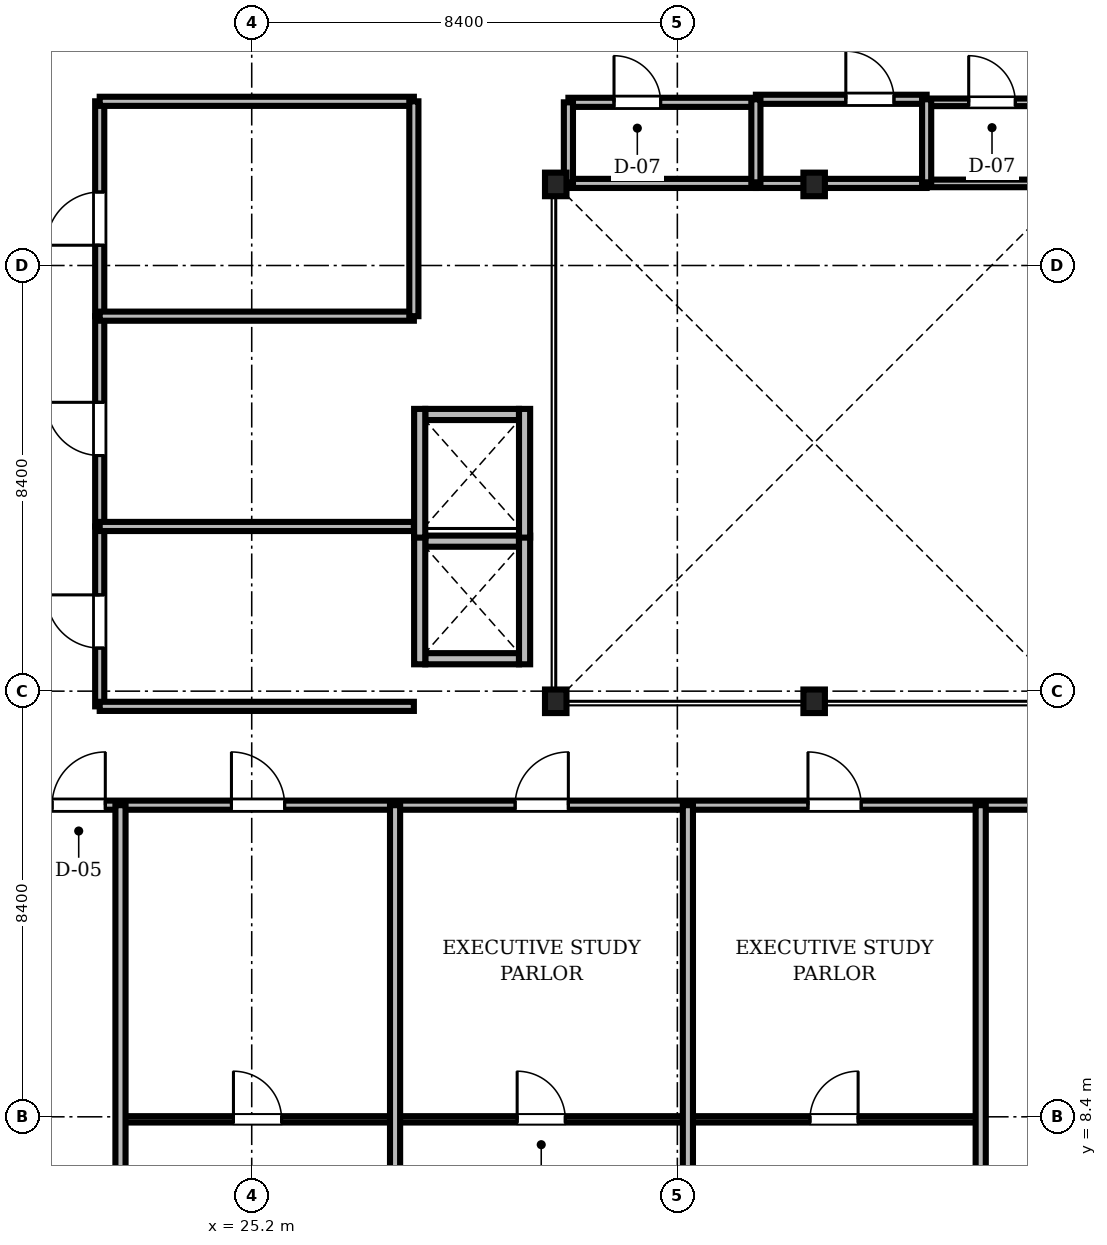
"""IFC4 building model, lengths in metres.
Left out: names, types, materials, properties, quantities, classifications, styles, units other than length and angle.
Written with IfcOpenShell. Run it as: python <this file> out.ifc"""

import sys

from ifc_helpers import new_model, si_unit, direction, frame, frame_2d, origin, origin_2d, place, context, subcontext, project, spatial, rectangle, i_section, extrude, source, transform, mapped, element, fill, save


model = new_model("IFC4")
c1 = context("Model", 3, precision=1e-05, world=origin(), true_north=direction((0.0, 1.0)))
c2 = subcontext(c1, "Body", "Model", "MODEL_VIEW")
j1 = project(units=[si_unit("LENGTHUNIT", "METRE"), si_unit("PLANEANGLEUNIT", "RADIAN")], contexts=[c1])
p1 = place(None, origin())
s1 = spatial("IfcSite", under=j1, at=p1, CompositionType="ELEMENT")
p2 = place(p1, origin())
s2 = spatial("IfcBuilding", under=s1, at=p2, CompositionType="ELEMENT")
p3 = place(p2, frame((0.0, 0.0, 148.3)))
s3 = spatial("IfcBuildingStorey", under=s2, at=p3, CompositionType="ELEMENT", Elevation=148.3)
m1 = source(origin(), c2, "Body", "SweptSolid", [
    extrude(i_section(OverallWidth=0.424, OverallDepth=0.465, WebThickness=0.035, FlangeThickness=0.056, FilletRadius=0.015, at=origin_2d()), origin(), (0.0, 0.0, 1.0), 3.46),
])
for number, where, z_axis, x_axis in (
    (1, (31.2, 16.6, 0.0), (0.0, 0.0, 1.0), (1.0, 0.0, 0.0)),
    (2, (36.3, 16.6, 0.0), (0.0, 0.0, 1.0), (1.0, 0.0, 0.0)),
    (3, (36.3, 26.8, 0.0), (0.0, 0.0, 1.0), (1.0, 0.0, 0.0)),
    (4, (31.2, 26.8, 0.0), (0.0, 0.0, 1.0), (1.0, 0.0, 0.0)),
):
    element("IfcColumn", number, at=place(p3, frame(where, z_axis=z_axis, x_axis=x_axis)), inside=s3, PredefinedType="COLUMN", context=c2, shape_type="MappedRepresentation", body=[
        mapped(m1, transform((0.0, 0.0, 0.0), scale=1.0)),
    ])
m2 = source(origin(), c2, "Body", "SweptSolid", [
    extrude(rectangle(XDim=1.85, YDim=0.22, at=frame_2d((0.925, 0.0))), origin(), (0.0, 0.0, 1.0), 3.46),
])
for number, where, z_axis, x_axis in (
    (5, (28.625, 17.44, 0.0), (0.0, 0.0, 1.0), (1.0, 0.0, 0.0)),
    (6, (28.625, 19.76, 0.0), (0.0, 0.0, 1.0), (1.0, 0.0, 0.0)),
):
    element("IfcWall", number, at=place(p3, frame(where, z_axis=z_axis, x_axis=x_axis)), inside=s3, PredefinedType="SOLIDWALL", context=c2, shape_type="MappedRepresentation", body=[
        mapped(m2, transform((0.0, 0.0, 0.0), scale=1.0)),
    ])
m3 = source(origin(), c2, "Body", "SweptSolid", [
    extrude(rectangle(XDim=2.54, YDim=0.22, at=frame_2d((1.27, 0.0))), origin(), (0.0, 0.0, 1.0), 3.46),
])
for number, where, z_axis, x_axis in (
    (7, (28.515, 17.33, 0.0), (0.0, 0.0, 1.0), (0.0, 1.0, 0.0)),
    (8, (30.585, 17.33, 0.0), (0.0, 0.0, 1.0), (0.0, 1.0, 0.0)),
):
    element("IfcWall", number, at=place(p3, frame(where, z_axis=z_axis, x_axis=x_axis)), inside=s3, PredefinedType="SOLIDWALL", context=c2, shape_type="MappedRepresentation", body=[
        mapped(m3, transform((0.0, 0.0, 0.0), scale=1.0)),
    ])
p4 = place(p3, frame((28.625, 22.26, 0.0), z_axis=(0.0, 0.0, 1.0), x_axis=(1.0, 0.0, 0.0)))
e9 = element("IfcWall", 9, at=p4, inside=s3, PredefinedType="SOLIDWALL", context=c2, shape_type="MappedRepresentation", body=[
    mapped(m2, transform((0.0, 0.0, 0.0), scale=1.0)),
])
for number, where, z_axis, x_axis in (
    (10, (28.515, 19.83, 0.0), (0.0, 0.0, 1.0), (0.0, 1.0, 0.0)),
    (11, (30.585, 19.83, 0.0), (0.0, 0.0, 1.0), (0.0, 1.0, 0.0)),
):
    element("IfcWall", number, at=place(p3, frame(where, z_axis=z_axis, x_axis=x_axis)), inside=s3, PredefinedType="SOLIDWALL", context=c2, shape_type="MappedRepresentation", body=[
        mapped(m3, transform((0.0, 0.0, 0.0), scale=1.0)),
    ])
m4 = source(origin(), c2, "Body", "SweptSolid", [
    extrude(rectangle(XDim=46.156, YDim=0.18, at=frame_2d((23.078, 0.0))), origin(), (0.0, 0.0, 1.0), 2.702),
])
p5 = place(p3, frame((6.922, 14.55, 0.0), z_axis=(0.0, 0.0, 1.0), x_axis=(1.0, 0.0, 0.0)))
e12 = element("IfcWall", 12, at=p5, inside=s3, PredefinedType="PARTITIONING", context=c2, shape_type="MappedRepresentation", body=[
    mapped(m4, transform((0.0, 0.0, 0.0), scale=1.0)),
])
m5 = source(origin(), c2, "Body", "SweptSolid", [
    extrude(rectangle(XDim=1.05, YDim=2.2, at=frame_2d((0.525, 1.1))), frame((0.0, 0.1, 0.0), z_axis=(0.0, -1.0, 0.0), x_axis=(1.0, 0.0, 0.0)), (0.0, 0.0, 1.0), 0.2),
])
p6 = place(p5, frame((14.338, 0.0, 0.0)))
e13 = element("IfcOpeningElement", 13, at=p6, cuts=e12, PredefinedType="OPENING", context=c2, shape_type="MappedRepresentation", body=[
    mapped(m5, transform((0.0, 0.0, 0.0), scale=1.0)),
])
p7 = place(p5, frame((17.878, 0.0, 0.0)))
e14 = element("IfcOpeningElement", 14, at=p7, cuts=e12, PredefinedType="OPENING", context=c2, shape_type="MappedRepresentation", body=[
    mapped(m5, transform((0.0, 0.0, 0.0), scale=1.0)),
])
p8 = place(p5, frame((23.477, 0.0, 0.0)))
e15 = element("IfcOpeningElement", 15, at=p8, cuts=e12, PredefinedType="OPENING", context=c2, shape_type="MappedRepresentation", body=[
    mapped(m5, transform((0.0, 0.0, 0.0), scale=1.0)),
])
p9 = place(p5, frame((29.256, 0.0, 0.0)))
e16 = element("IfcOpeningElement", 16, at=p9, cuts=e12, PredefinedType="OPENING", context=c2, shape_type="MappedRepresentation", body=[
    mapped(m5, transform((0.0, 0.0, 0.0), scale=1.0)),
])
p10 = place(p5, frame((35.035, 0.0, 0.0)))
e17 = element("IfcOpeningElement", 17, at=p10, cuts=e12, PredefinedType="OPENING", context=c2, shape_type="MappedRepresentation", body=[
    mapped(m5, transform((0.0, 0.0, 0.0), scale=1.0)),
])
p11 = place(p5, frame((41.766, 0.0, 0.0)))
e18 = element("IfcOpeningElement", 18, at=p11, cuts=e12, PredefinedType="OPENING", context=c2, shape_type="MappedRepresentation", body=[
    mapped(m5, transform((0.0, 0.0, 0.0), scale=1.0)),
])
m6 = source(origin(), c2, "Body", "SweptSolid", [
    extrude(rectangle(XDim=5.779, YDim=0.125, at=frame_2d((2.89, 0.0))), origin(), (0.0, 0.0, 1.0), 2.852),
])
p12 = place(p3, frame((28.029, 8.35, 0.0), z_axis=(0.0, 0.0, 1.0), x_axis=(1.0, 0.0, 0.0)))
e19 = element("IfcWall", 19, at=p12, inside=s3, PredefinedType="PARTITIONING", context=c2, shape_type="MappedRepresentation", body=[
    mapped(m6, transform((0.0, 0.0, 0.0), scale=1.0)),
])
m7 = source(origin(), c2, "Body", "SweptSolid", [
    extrude(rectangle(XDim=0.95, YDim=2.15, at=frame_2d((0.475, 1.075))), frame((0.0, 0.073, 0.0), z_axis=(0.0, -1.0, 0.0), x_axis=(1.0, 0.0, 0.0)), (0.0, 0.0, 1.0), 0.145),
])
p13 = place(p12, frame((2.41, 0.0, 0.0)))
e20 = element("IfcOpeningElement", 20, at=p13, cuts=e19, PredefinedType="OPENING", context=c2, shape_type="MappedRepresentation", body=[
    mapped(m7, transform((0.0, 0.0, 0.0), scale=1.0)),
])
m8 = source(origin(), c2, "Body", "SweptSolid", [
    extrude(rectangle(XDim=5.779, YDim=0.125, at=frame_2d((2.889, 0.0))), origin(), (0.0, 0.0, 1.0), 2.852),
])
p14 = place(p3, frame((33.808, 8.35, 0.0), z_axis=(0.0, 0.0, 1.0), x_axis=(1.0, 0.0, 0.0)))
e21 = element("IfcWall", 21, at=p14, inside=s3, PredefinedType="PARTITIONING", context=c2, shape_type="MappedRepresentation", body=[
    mapped(m8, transform((0.0, 0.0, 0.0), scale=1.0)),
])
p15 = place(p14, frame((2.41, 0.0, 0.0)))
e22 = element("IfcOpeningElement", 22, at=p15, cuts=e21, PredefinedType="OPENING", context=c2, shape_type="MappedRepresentation", body=[
    mapped(m7, transform((0.0, 0.0, 0.0), scale=1.0)),
])
m9 = source(origin(), c2, "Body", "SweptSolid", [
    extrude(rectangle(XDim=5.419, YDim=0.125, at=frame_2d((2.709, 0.0))), origin(), (0.0, 0.0, 1.0), 2.852),
])
p16 = place(p3, frame((22.61, 8.35, 0.0), z_axis=(0.0, 0.0, 1.0), x_axis=(1.0, 0.0, 0.0)))
e23 = element("IfcWall", 23, at=p16, inside=s3, PredefinedType="PARTITIONING", context=c2, shape_type="MappedRepresentation", body=[
    mapped(m9, transform((0.0, 0.0, 0.0), scale=1.0)),
])
p17 = place(p16, frame((2.229, 0.0, 0.0)))
e24 = element("IfcOpeningElement", 24, at=p17, cuts=e23, PredefinedType="OPENING", context=c2, shape_type="MappedRepresentation", body=[
    mapped(m7, transform((0.0, 0.0, 0.0), scale=1.0)),
])
m10 = source(origin(), c2, "Body", "SweptSolid", [
    extrude(rectangle(XDim=4.24, YDim=0.18, at=frame_2d((2.12, 0.0))), origin(), (0.0, 0.0, 1.0), 2.852),
])
p18 = place(p3, frame((22.2, 24.2, 0.0), z_axis=(0.0, 0.0, 1.0), x_axis=(0.0, 1.0, 0.0)))
e25 = element("IfcWall", 25, at=p18, inside=s3, PredefinedType="PARTITIONING", context=c2, shape_type="MappedRepresentation", body=[
    mapped(m10, transform((0.0, 0.0, 0.0), scale=1.0)),
])
p19 = place(p18, frame((1.4, 0.0, 0.0)))
e26 = element("IfcOpeningElement", 26, at=p19, cuts=e25, PredefinedType="OPENING", context=c2, shape_type="MappedRepresentation", body=[
    mapped(m5, transform((0.0, 0.0, 0.0), scale=1.0)),
])
m11 = source(origin(), c2, "Body", "SweptSolid", [
    extrude(rectangle(XDim=4.15, YDim=0.18, at=frame_2d((2.075, 0.0))), origin(), (0.0, 0.0, 1.0), 3.122),
])
p20 = place(p3, frame((22.2, 20.05, 0.0), z_axis=(0.0, 0.0, 1.0), x_axis=(0.0, 1.0, 0.0)))
e27 = element("IfcWall", 27, at=p20, inside=s3, PredefinedType="PARTITIONING", context=c2, shape_type="MappedRepresentation", body=[
    mapped(m11, transform((0.0, 0.0, 0.0), scale=1.0)),
])
p21 = place(p20, frame((1.4, 0.0, 0.0)))
e28 = element("IfcOpeningElement", 28, at=p21, cuts=e27, PredefinedType="OPENING", context=c2, shape_type="MappedRepresentation", body=[
    mapped(m5, transform((0.0, 0.0, 0.0), scale=1.0)),
])
m12 = source(origin(), c2, "Body", "SweptSolid", [
    extrude(rectangle(XDim=3.7, YDim=0.18, at=frame_2d((1.85, 0.0))), origin(), (0.0, 0.0, 1.0), 3.092),
])
p22 = place(p3, frame((31.45, 28.42, 0.0), z_axis=(0.0, 0.0, 1.0), x_axis=(1.0, 0.0, 0.0)))
e29 = element("IfcWall", 29, at=p22, inside=s3, PredefinedType="PARTITIONING", context=c2, shape_type="MappedRepresentation", body=[
    mapped(m12, transform((0.0, 0.0, 0.0), scale=1.0)),
])
m13 = source(origin(), c2, "Body", "SweptSolid", [
    extrude(rectangle(XDim=0.92, YDim=2.1, at=frame_2d((0.46, 1.05))), frame((0.0, 0.1, 0.0), z_axis=(0.0, -1.0, 0.0), x_axis=(1.0, 0.0, 0.0)), (0.0, 0.0, 1.0), 0.2),
])
p23 = place(p22, frame((0.9, 0.0, 0.0)))
e30 = element("IfcOpeningElement", 30, at=p23, cuts=e29, PredefinedType="OPENING", context=c2, shape_type="MappedRepresentation", body=[
    mapped(m13, transform((0.0, 0.0, 0.0), scale=1.0)),
])
m14 = source(origin(), c2, "Body", "SweptSolid", [
    extrude(rectangle(XDim=3.55, YDim=0.18, at=frame_2d((1.775, 0.0))), origin(), (0.0, 0.0, 1.0), 2.852),
])
p24 = place(p3, frame((22.2, 16.5, 0.0), z_axis=(0.0, 0.0, 1.0), x_axis=(0.0, 1.0, 0.0)))
e31 = element("IfcWall", 31, at=p24, inside=s3, PredefinedType="PARTITIONING", context=c2, shape_type="MappedRepresentation", body=[
    mapped(m14, transform((0.0, 0.0, 0.0), scale=1.0)),
])
p25 = place(p24, frame((1.15, 0.0, 0.0)))
e32 = element("IfcOpeningElement", 32, at=p25, cuts=e31, PredefinedType="OPENING", context=c2, shape_type="MappedRepresentation", body=[
    mapped(m5, transform((0.0, 0.0, 0.0), scale=1.0)),
])
m15 = source(origin(), c2, "Body", "SweptSolid", [
    extrude(rectangle(XDim=3.37, YDim=0.18, at=frame_2d((1.685, 0.0))), origin(), (0.0, 0.0, 1.0), 3.46),
])
p26 = place(p3, frame((35.15, 28.48, 0.0), z_axis=(0.0, 0.0, 1.0), x_axis=(1.0, 0.0, 0.0)))
e33 = element("IfcWall", 33, at=p26, inside=s3, PredefinedType="PARTITIONING", context=c2, shape_type="MappedRepresentation", body=[
    mapped(m15, transform((0.0, 0.0, 0.0), scale=1.0)),
])
m16 = source(origin(), c2, "Body", "SweptSolid", [
    extrude(rectangle(XDim=0.95, YDim=2.15, at=frame_2d((0.475, 1.075))), frame((0.0, 0.1, 0.0), z_axis=(0.0, -1.0, 0.0), x_axis=(1.0, 0.0, 0.0)), (0.0, 0.0, 1.0), 0.2),
])
p27 = place(p26, frame((1.775, 0.0, 0.0)))
e34 = element("IfcOpeningElement", 34, at=p27, cuts=e33, PredefinedType="OPENING", context=c2, shape_type="MappedRepresentation", body=[
    mapped(m16, transform((0.0, 0.0, 0.0), scale=1.0)),
])
m17 = source(origin(), c2, "Body", "SweptSolid", [
    extrude(rectangle(XDim=3.0, YDim=0.15, at=frame_2d((1.5, 0.0))), origin(), (0.0, 0.0, 1.0), 3.46),
])
p28 = place(p3, frame((38.52, 28.42, 0.0), z_axis=(0.0, 0.0, 1.0), x_axis=(1.0, 0.0, 0.0)))
e35 = element("IfcWall", 35, at=p28, inside=s3, PredefinedType="PARTITIONING", context=c2, shape_type="MappedRepresentation", body=[
    mapped(m17, transform((0.0, 0.0, 0.0), scale=1.0)),
])
m18 = source(origin(), c2, "Body", "SweptSolid", [
    extrude(rectangle(XDim=0.92, YDim=2.1, at=frame_2d((0.46, 1.05))), frame((0.0, 0.085, 0.0), z_axis=(0.0, -1.0, 0.0), x_axis=(1.0, 0.0, 0.0)), (0.0, 0.0, 1.0), 0.17),
])
p29 = place(p28, frame((0.83, 0.0, 0.0)))
e36 = element("IfcOpeningElement", 36, at=p29, cuts=e35, PredefinedType="OPENING", context=c2, shape_type="MappedRepresentation", body=[
    mapped(m18, transform((0.0, 0.0, 0.0), scale=1.0)),
])
m19 = source(origin(), c2, "Body", "SweptSolid", [
    extrude(rectangle(XDim=12.428, YDim=0.2, at=frame_2d((6.214, 0.0))), origin(), (0.0, 0.0, 1.0), 2.702),
])
p30 = place(p3, frame((22.61, 2.122, 0.0), z_axis=(0.0, 0.0, 1.0), x_axis=(0.0, 1.0, 0.0)))
e37 = element("IfcWall", 37, at=p30, inside=s3, PredefinedType="PARTITIONING", context=c2, shape_type="MappedRepresentation", body=[
    mapped(m19, transform((0.0, 0.0, 0.0), scale=1.0)),
])
m20 = source(origin(), c2, "Body", "SweptSolid", [
    extrude(rectangle(XDim=12.62, YDim=0.2, at=frame_2d((6.31, 0.0))), origin(), (0.0, 0.0, 1.0), 2.702),
])
p31 = place(p3, frame((28.029, 1.93, 0.0), z_axis=(0.0, 0.0, 1.0), x_axis=(0.0, 1.0, 0.0)))
e38 = element("IfcWall", 38, at=p31, inside=s3, PredefinedType="PARTITIONING", context=c2, shape_type="MappedRepresentation", body=[
    mapped(m20, transform((0.0, 0.0, 0.0), scale=1.0)),
])
for number, where, z_axis, x_axis in (
    (39, (33.808, 2.122, 0.0), (0.0, 0.0, 1.0), (0.0, 1.0, 0.0)),
    (40, (39.587, 2.122, 0.0), (0.0, 0.0, 1.0), (0.0, 1.0, 0.0)),
):
    element("IfcWall", number, at=place(p3, frame(where, z_axis=z_axis, x_axis=x_axis)), inside=s3, PredefinedType="PARTITIONING", context=c2, shape_type="MappedRepresentation", body=[
        mapped(m19, transform((0.0, 0.0, 0.0), scale=1.0)),
    ])
m21 = source(origin(), c2, "Body", "SweptSolid", [
    extrude(rectangle(XDim=6.2, YDim=0.18, at=frame_2d((3.1, 0.0))), origin(), (0.0, 0.0, 1.0), 3.46),
])
for number, where, z_axis, x_axis in (
    (41, (22.2, 16.5, 0.0), (0.0, 0.0, 1.0), (1.0, 0.0, 0.0)),
    (42, (22.2, 20.05, 0.0), (0.0, 0.0, 1.0), (1.0, 0.0, 0.0)),
    (43, (22.2, 24.2, 0.0), (0.0, 0.0, 1.0), (1.0, 0.0, 0.0)),
    (44, (22.2, 28.44, 0.0), (0.0, 0.0, 1.0), (1.0, 0.0, 0.0)),
):
    element("IfcWall", number, at=place(p3, frame(where, z_axis=z_axis, x_axis=x_axis)), inside=s3, PredefinedType="PARTITIONING", context=c2, shape_type="MappedRepresentation", body=[
        mapped(m21, transform((0.0, 0.0, 0.0), scale=1.0)),
    ])
p32 = place(p3, frame((28.4, 24.2, 0.0), z_axis=(0.0, 0.0, 1.0), x_axis=(0.0, 1.0, 0.0)))
e45 = element("IfcWall", 45, at=p32, inside=s3, PredefinedType="PARTITIONING", context=c2, shape_type="MappedRepresentation", body=[
    mapped(m10, transform((0.0, 0.0, 0.0), scale=1.0)),
])
m22 = source(origin(), c2, "Body", "SweptSolid", [
    extrude(rectangle(XDim=3.7, YDim=0.18, at=frame_2d((1.85, 0.0))), origin(), (0.0, 0.0, 1.0), 3.002),
])
p33 = place(p3, frame((31.45, 26.82, 0.0), z_axis=(0.0, 0.0, 1.0), x_axis=(1.0, 0.0, 0.0)))
e46 = element("IfcWall", 46, at=p33, inside=s3, PredefinedType="PARTITIONING", context=c2, shape_type="MappedRepresentation", body=[
    mapped(m22, transform((0.0, 0.0, 0.0), scale=1.0)),
])
m23 = source(origin(), c2, "Body", "SweptSolid", [
    extrude(rectangle(XDim=3.37, YDim=0.18, at=frame_2d((1.685, 0.0))), origin(), (0.0, 0.0, 1.0), 3.002),
])
p34 = place(p3, frame((35.15, 26.82, 0.0), z_axis=(0.0, 0.0, 1.0), x_axis=(1.0, 0.0, 0.0)))
e47 = element("IfcWall", 47, at=p34, inside=s3, PredefinedType="PARTITIONING", context=c2, shape_type="MappedRepresentation", body=[
    mapped(m23, transform((0.0, 0.0, 0.0), scale=1.0)),
])
m24 = source(origin(), c2, "Body", "SweptSolid", [
    extrude(rectangle(XDim=3.0, YDim=0.15, at=frame_2d((1.5, 0.0))), origin(), (0.0, 0.0, 1.0), 2.852),
])
p35 = place(p3, frame((38.52, 26.82, 0.0), z_axis=(0.0, 0.0, 1.0), x_axis=(1.0, 0.0, 0.0)))
e48 = element("IfcWall", 48, at=p35, inside=s3, PredefinedType="PARTITIONING", context=c2, shape_type="MappedRepresentation", body=[
    mapped(m24, transform((0.0, 0.0, 0.0), scale=1.0)),
])
m25 = source(origin(), c2, "Body", "SweptSolid", [
    extrude(rectangle(XDim=1.66, YDim=0.18, at=frame_2d((0.83, 0.0))), origin(), (0.0, 0.0, 1.0), 3.002),
])
for number, where, z_axis, x_axis in (
    (49, (35.15, 26.82, 0.0), (0.0, 0.0, 1.0), (0.0, 1.0, 0.0)),
    (50, (38.52, 26.82, 0.0), (0.0, 0.0, 1.0), (0.0, 1.0, 0.0)),
):
    element("IfcWall", number, at=place(p3, frame(where, z_axis=z_axis, x_axis=x_axis)), inside=s3, PredefinedType="PARTITIONING", context=c2, shape_type="MappedRepresentation", body=[
        mapped(m25, transform((0.0, 0.0, 0.0), scale=1.0)),
    ])
m26 = source(origin(), c2, "Body", "SweptSolid", [
    extrude(rectangle(XDim=1.6, YDim=0.18, at=frame_2d((0.8, 0.0))), origin(), (0.0, 0.0, 1.0), 3.002),
])
p36 = place(p3, frame((31.45, 26.82, 0.0), z_axis=(0.0, 0.0, 1.0), x_axis=(0.0, 1.0, 0.0)))
e51 = element("IfcWall", 51, at=p36, inside=s3, PredefinedType="PARTITIONING", context=c2, shape_type="MappedRepresentation", body=[
    mapped(m26, transform((0.0, 0.0, 0.0), scale=1.0)),
])
m27 = source(origin(), c2, "Body", "SweptSolid", [
    extrude(rectangle(XDim=1.05, YDim=2.2, at=frame_2d((0.525, 1.1))), frame((0.0, 0.025, 0.0), z_axis=(0.0, -1.0, 0.0), x_axis=(1.0, 0.0, 0.0)), (0.0, 0.0, 1.0), 0.05),
])
p37 = place(p6, origin())
e52 = element("IfcDoor", 52, at=p37, inside=s3, OperationType="SINGLE_SWING_RIGHT", PredefinedType="DOOR", context=c2, shape_type="MappedRepresentation", body=[
    mapped(m27, transform((0.0, 0.0, 0.0), scale=1.0)),
])
fill(e13, e52)
p38 = place(p7, origin())
e53 = element("IfcDoor", 53, at=p38, inside=s3, OperationType="SINGLE_SWING_LEFT", PredefinedType="DOOR", context=c2, shape_type="MappedRepresentation", body=[
    mapped(m27, transform((0.0, 0.0, 0.0), scale=1.0)),
])
fill(e14, e53)
p39 = place(p8, origin())
e54 = element("IfcDoor", 54, at=p39, inside=s3, OperationType="SINGLE_SWING_RIGHT", PredefinedType="DOOR", context=c2, shape_type="MappedRepresentation", body=[
    mapped(m27, transform((0.0, 0.0, 0.0), scale=1.0)),
])
fill(e15, e54)
p40 = place(p9, origin())
e55 = element("IfcDoor", 55, at=p40, inside=s3, OperationType="SINGLE_SWING_LEFT", PredefinedType="DOOR", context=c2, shape_type="MappedRepresentation", body=[
    mapped(m27, transform((0.0, 0.0, 0.0), scale=1.0)),
])
fill(e16, e55)
m28 = source(origin(), c2, "Body", "SweptSolid", [
    extrude(rectangle(XDim=0.95, YDim=2.15, at=frame_2d((0.475, 1.075))), frame((0.0, 0.025, 0.0), z_axis=(0.0, -1.0, 0.0), x_axis=(1.0, 0.0, 0.0)), (0.0, 0.0, 1.0), 0.05),
])
p41 = place(p13, origin())
e56 = element("IfcDoor", 56, at=p41, inside=s3, OperationType="SINGLE_SWING_LEFT", PredefinedType="DOOR", context=c2, shape_type="MappedRepresentation", body=[
    mapped(m28, transform((0.0, 0.0, 0.0), scale=1.0)),
])
fill(e20, e56)
p42 = place(p15, origin())
e57 = element("IfcDoor", 57, at=p42, inside=s3, OperationType="SINGLE_SWING_RIGHT", PredefinedType="DOOR", context=c2, shape_type="MappedRepresentation", body=[
    mapped(m28, transform((0.0, 0.0, 0.0), scale=1.0)),
])
fill(e22, e57)
p43 = place(p17, origin())
e58 = element("IfcDoor", 58, at=p43, inside=s3, OperationType="SINGLE_SWING_LEFT", PredefinedType="DOOR", context=c2, shape_type="MappedRepresentation", body=[
    mapped(m28, transform((0.0, 0.0, 0.0), scale=1.0)),
])
fill(e24, e58)
p44 = place(p19, origin())
e59 = element("IfcDoor", 59, at=p44, inside=s3, OperationType="SINGLE_SWING_LEFT", PredefinedType="DOOR", context=c2, shape_type="MappedRepresentation", body=[
    mapped(m27, transform((0.0, 0.0, 0.0), scale=1.0)),
])
fill(e26, e59)
p45 = place(p21, origin())
e60 = element("IfcDoor", 60, at=p45, inside=s3, OperationType="SINGLE_SWING_RIGHT", PredefinedType="DOOR", context=c2, shape_type="MappedRepresentation", body=[
    mapped(m27, transform((0.0, 0.0, 0.0), scale=1.0)),
])
fill(e28, e60)
m29 = source(origin(), c2, "Body", "SweptSolid", [
    extrude(rectangle(XDim=0.92, YDim=2.1, at=frame_2d((0.46, 1.05))), frame((0.0, 0.025, 0.0), z_axis=(0.0, -1.0, 0.0), x_axis=(1.0, 0.0, 0.0)), (0.0, 0.0, 1.0), 0.05),
])
p46 = place(p23, origin())
e61 = element("IfcDoor", 61, at=p46, inside=s3, OperationType="SINGLE_SWING_LEFT", PredefinedType="DOOR", context=c2, shape_type="MappedRepresentation", body=[
    mapped(m29, transform((0.0, 0.0, 0.0), scale=1.0)),
])
fill(e30, e61)
p47 = place(p25, origin())
e62 = element("IfcDoor", 62, at=p47, inside=s3, OperationType="SINGLE_SWING_RIGHT", PredefinedType="DOOR", context=c2, shape_type="MappedRepresentation", body=[
    mapped(m27, transform((0.0, 0.0, 0.0), scale=1.0)),
])
fill(e32, e62)
p48 = place(p27, origin())
e63 = element("IfcDoor", 63, at=p48, inside=s3, OperationType="SINGLE_SWING_LEFT", PredefinedType="DOOR", context=c2, shape_type="MappedRepresentation", body=[
    mapped(m28, transform((0.0, 0.0, 0.0), scale=1.0)),
])
fill(e34, e63)
p49 = place(p29, origin())
e64 = element("IfcDoor", 64, at=p49, inside=s3, OperationType="SINGLE_SWING_LEFT", PredefinedType="DOOR", context=c2, shape_type="MappedRepresentation", body=[
    mapped(m29, transform((0.0, 0.0, 0.0), scale=1.0)),
])
fill(e36, e64)
save(model, sys.argv[1])
